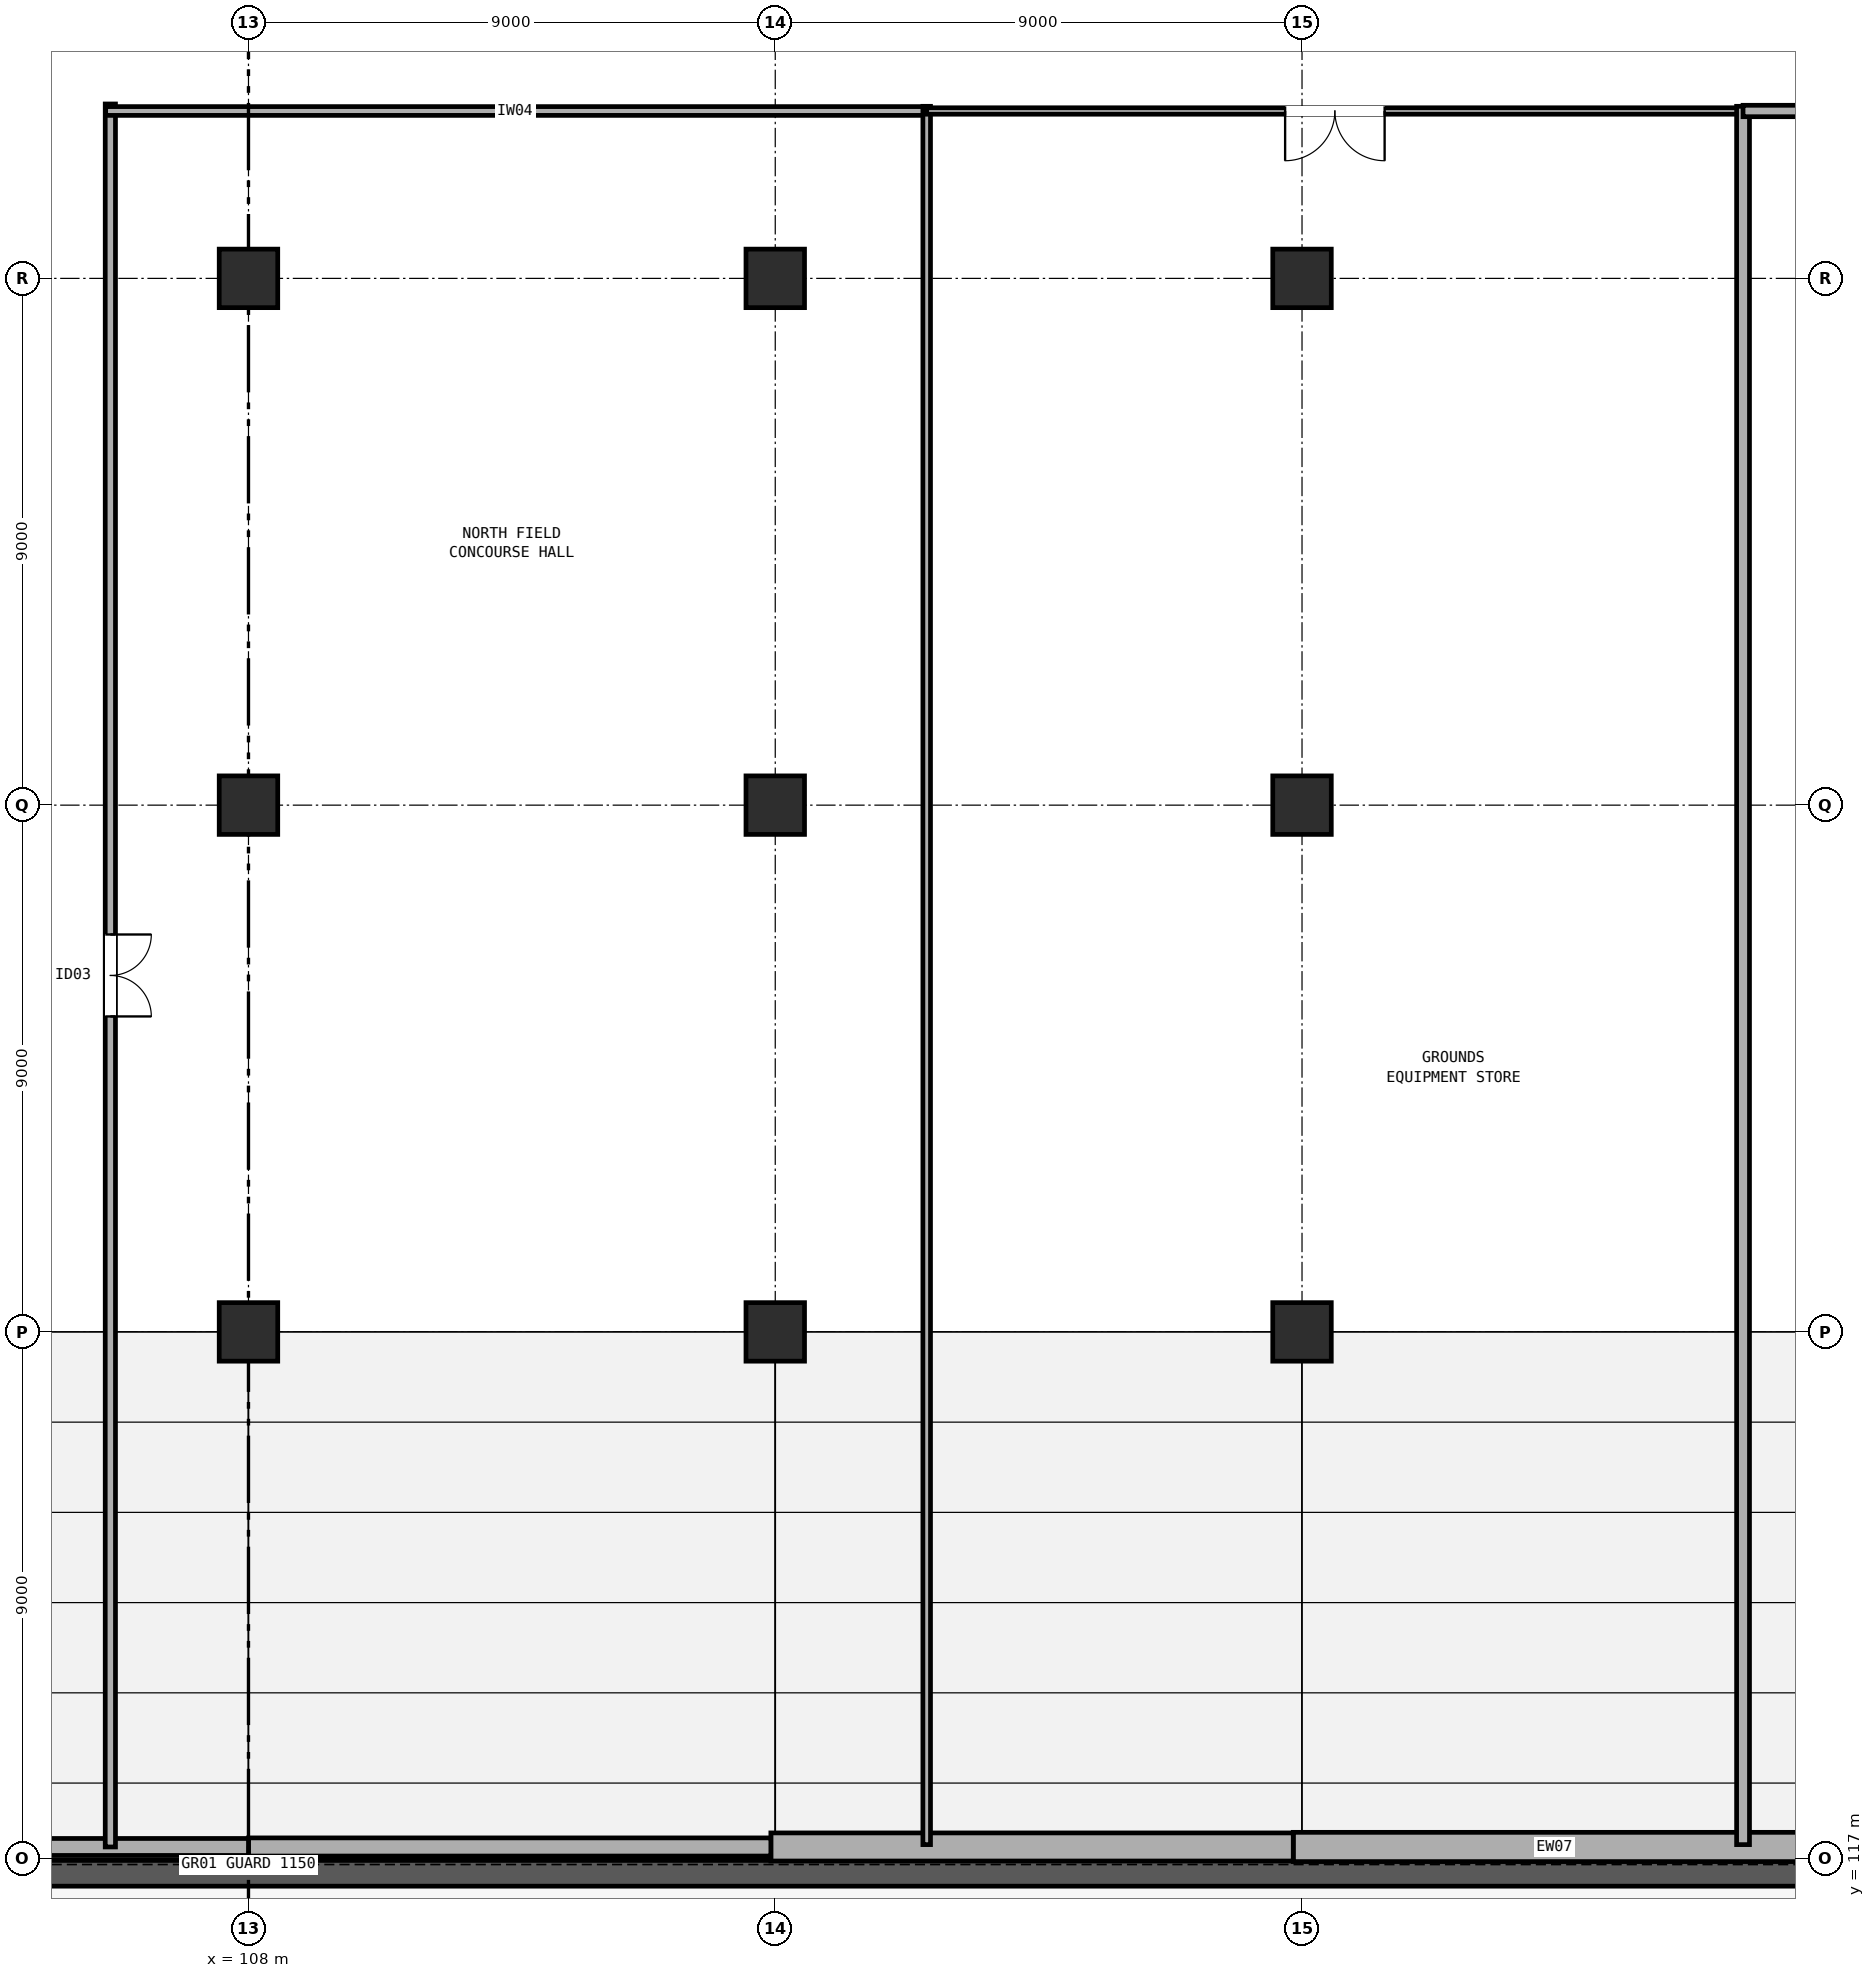
"""IFC4 building model, lengths in metres.
Left out: names, types, materials, properties, quantities, classifications, styles, units other than length and angle.
Written with IfcOpenShell. Run it as: python <this file> out.ifc"""

import sys

from ifc_helpers import new_model, si_unit, direction, frame, frame_2d, origin, origin_2d, place, context, subcontext, project, spatial, rectangle, extrude, element, fill, save


model = new_model("IFC4")
c1 = context("Model", 3, precision=1e-05, world=origin(), true_north=direction((0.0, 1.0)))
c2 = subcontext(c1, "Body", "Model", "MODEL_VIEW")
j1 = project(units=[si_unit("LENGTHUNIT", "METRE"), si_unit("PLANEANGLEUNIT", "RADIAN")], contexts=[c1])
p1 = place(None, origin())
s1 = spatial("IfcSite", under=j1, at=p1, CompositionType="ELEMENT")
p2 = place(p1, origin())
s2 = spatial("IfcBuilding", under=s1, at=p2, CompositionType="ELEMENT")
p3 = place(p2, origin())
s3 = spatial("IfcBuildingStorey", under=s2, at=p3, CompositionType="ELEMENT", Elevation=0.0)
for number, where, z_axis, x_axis in (
    (1, (108.0, 126.0, 0.0), (0.0, 0.0, 1.0), (1.0, 0.0, 0.0)),
    (2, (108.0, 135.0, 0.0), (0.0, 0.0, 1.0), (1.0, 0.0, 0.0)),
    (3, (108.0, 144.0, 0.0), (0.0, 0.0, 1.0), (1.0, 0.0, 0.0)),
    (4, (117.0, 126.0, 0.0), (0.0, 0.0, 1.0), (1.0, 0.0, 0.0)),
    (5, (117.0, 135.0, 0.0), (0.0, 0.0, 1.0), (1.0, 0.0, 0.0)),
    (6, (117.0, 144.0, 0.0), (0.0, 0.0, 1.0), (1.0, 0.0, 0.0)),
    (7, (126.0, 126.0, 0.0), (0.0, 0.0, 1.0), (1.0, 0.0, 0.0)),
    (8, (126.0, 135.0, 0.0), (0.0, 0.0, 1.0), (1.0, 0.0, 0.0)),
    (9, (126.0, 144.0, 0.0), (0.0, 0.0, 1.0), (1.0, 0.0, 0.0)),
):
    element("IfcColumn", number, at=place(p3, frame(where, z_axis=z_axis, x_axis=x_axis)), inside=s3, PredefinedType="COLUMN", context=c2, shape_type="SweptSolid", body=[
        extrude(rectangle(XDim=1.0, YDim=1.0, at=origin_2d()), origin(), (0.0, 0.0, 1.0), 4.8),
    ])
p4 = place(p3, frame((160.9, 116.75, 0.0), z_axis=(0.0, 0.0, 1.0), x_axis=(-1.0, 0.0, 0.0)))
e10 = element("IfcWall", 10, at=p4, inside=s3, PredefinedType="SOLIDWALL", context=c2, shape_type="SweptSolid", body=[
    extrude(rectangle(XDim=105.8, YDim=0.44, at=frame_2d((52.9, 0.0))), origin(), (0.0, 0.0, 1.0), 0.9),
])
p5 = place(p3, frame((134.775, 117.2, 0.0), z_axis=(0.0, 0.0, 1.0), x_axis=(-1.0, 0.0, 0.0)))
e11 = element("IfcWall", 11, at=p5, inside=s3, PredefinedType="SOLIDWALL", context=c2, shape_type="SweptSolid", body=[
    extrude(rectangle(XDim=8.925, YDim=0.5, at=frame_2d((4.462, 0.0))), origin(), (0.0, 0.0, 1.0), 3.28),
])
p6 = place(p3, frame((125.85, 117.2, 0.0), z_axis=(0.0, 0.0, 1.0), x_axis=(-1.0, 0.0, 0.0)))
e12 = element("IfcWall", 12, at=p6, inside=s3, PredefinedType="SOLIDWALL", context=c2, shape_type="SweptSolid", body=[
    extrude(rectangle(XDim=8.925, YDim=0.48, at=frame_2d((4.462, 0.0))), origin(), (0.0, 0.0, 1.0), 3.28),
])
p7 = place(p3, frame((116.925, 117.2, 0.0), z_axis=(0.0, 0.0, 1.0), x_axis=(-1.0, 0.0, 0.0)))
e13 = element("IfcWall", 13, at=p7, inside=s3, PredefinedType="SOLIDWALL", context=c2, shape_type="SweptSolid", body=[
    extrude(rectangle(XDim=8.925, YDim=0.31, at=frame_2d((4.462, 0.0))), origin(), (0.0, 0.0, 1.0), 3.28),
])
p8 = place(p3, frame((108.0, 117.2, 0.0), z_axis=(0.0, 0.0, 1.0), x_axis=(-1.0, 0.0, 0.0)))
e14 = element("IfcWall", 14, at=p8, inside=s3, PredefinedType="SOLIDWALL", context=c2, shape_type="SweptSolid", body=[
    extrude(rectangle(XDim=8.925, YDim=0.29, at=frame_2d((4.462, 0.0))), origin(), (0.0, 0.0, 1.0), 3.28),
])
p9 = place(p3, frame((105.64, 146.98, 0.0), z_axis=(0.0, 0.0, 1.0), x_axis=(0.0, -1.0, 0.0)))
e15 = element("IfcWall", 15, at=p9, inside=s3, PredefinedType="PARTITIONING", context=c2, shape_type="SweptSolid", body=[
    extrude(rectangle(XDim=29.78, YDim=0.175, at=frame_2d((14.89, 0.0))), origin(), (0.0, 0.0, 1.0), 3.28),
])
p10 = place(p9, frame((14.19, 0.0, 0.0)))
e16 = element("IfcOpeningElement", 16, at=p10, cuts=e15, PredefinedType="OPENING", context=c2, shape_type="SweptSolid", body=[
    extrude(rectangle(XDim=1.4, YDim=2.15, at=frame_2d((0.7, 1.075))), frame((0.0, 0.097, 0.0), z_axis=(0.0, -1.0, 0.0), x_axis=(1.0, 0.0, 0.0)), (0.0, 0.0, 1.0), 0.195),
])
p11 = place(p3, frame((105.56, 146.86, 0.0), z_axis=(0.0, 0.0, 1.0), x_axis=(1.0, 0.0, 0.0)))
e17 = element("IfcWall", 17, at=p11, inside=s3, PredefinedType="PARTITIONING", context=c2, shape_type="SweptSolid", body=[
    extrude(rectangle(XDim=13.988, YDim=0.15, at=frame_2d((6.994, 0.0))), origin(), (0.0, 0.0, 1.0), 3.28),
])
p12 = place(p3, frame((119.587, 146.94, 0.0), z_axis=(0.0, 0.0, 1.0), x_axis=(0.0, -1.0, 0.0)))
e18 = element("IfcWall", 18, at=p12, inside=s3, PredefinedType="PARTITIONING", context=c2, shape_type="SweptSolid", body=[
    extrude(rectangle(XDim=29.7, YDim=0.13, at=frame_2d((14.85, 0.0))), origin(), (0.0, 0.0, 1.0), 3.28),
])
p13 = place(p3, frame((133.535, 146.86, 0.0), z_axis=(0.0, 0.0, 1.0), x_axis=(-1.0, 0.0, 0.0)))
e19 = element("IfcWall", 19, at=p13, inside=s3, PredefinedType="PARTITIONING", context=c2, shape_type="SweptSolid", body=[
    extrude(rectangle(XDim=13.948, YDim=0.11, at=frame_2d((6.974, 0.0))), origin(), (0.0, 0.0, 1.0), 3.28),
])
p14 = place(p13, frame((6.124, 0.0, 0.0)))
e20 = element("IfcOpeningElement", 20, at=p14, cuts=e19, PredefinedType="OPENING", context=c2, shape_type="SweptSolid", body=[
    extrude(rectangle(XDim=1.7, YDim=2.2, at=frame_2d((0.85, 1.1))), frame((0.0, 0.065, 0.0), z_axis=(0.0, -1.0, 0.0), x_axis=(1.0, 0.0, 0.0)), (0.0, 0.0, 1.0), 0.13),
])
p15 = place(p3, frame((133.535, 146.94, 0.0), z_axis=(0.0, 0.0, 1.0), x_axis=(0.0, -1.0, 0.0)))
e21 = element("IfcWall", 21, at=p15, inside=s3, PredefinedType="PARTITIONING", context=c2, shape_type="SweptSolid", body=[
    extrude(rectangle(XDim=29.7, YDim=0.22, at=frame_2d((14.85, 0.0))), origin(), (0.0, 0.0, 1.0), 3.28),
])
p16 = place(p3, frame((145.28, 146.86, 0.0), z_axis=(0.0, 0.0, 1.0), x_axis=(-1.0, 0.0, 0.0)))
e22 = element("IfcWall", 22, at=p16, inside=s3, PredefinedType="PARTITIONING", context=c2, shape_type="SweptSolid", body=[
    extrude(rectangle(XDim=11.745, YDim=0.195, at=frame_2d((5.873, 0.0))), origin(), (0.0, 0.0, 1.0), 3.28),
])
p17 = place(p16, frame((5.173, 0.0, 0.0)))
e23 = element("IfcOpeningElement", 23, at=p17, cuts=e22, PredefinedType="OPENING", context=c2, shape_type="SweptSolid", body=[
    extrude(rectangle(XDim=1.4, YDim=2.15, at=frame_2d((0.7, 1.075))), frame((0.0, 0.107, 0.0), z_axis=(0.0, -1.0, 0.0), x_axis=(1.0, 0.0, 0.0)), (0.0, 0.0, 1.0), 0.215),
])
p18 = place(p10, origin())
e24 = element("IfcDoor", 24, at=p18, inside=s3, OperationType="DOUBLE_DOOR_SINGLE_SWING", PredefinedType="DOOR", context=c2, shape_type="SweptSolid", body=[
    extrude(rectangle(XDim=1.4, YDim=2.15, at=frame_2d((0.7, 1.075))), frame((0.0, 0.025, 0.0), z_axis=(0.0, -1.0, 0.0), x_axis=(1.0, 0.0, 0.0)), (0.0, 0.0, 1.0), 0.05),
])
fill(e16, e24)
p19 = place(p14, origin())
e25 = element("IfcDoor", 25, at=p19, inside=s3, OperationType="DOUBLE_DOOR_SINGLE_SWING", PredefinedType="DOOR", context=c2, shape_type="SweptSolid", body=[
    extrude(rectangle(XDim=1.7, YDim=2.2, at=frame_2d((0.85, 1.1))), frame((0.0, 0.025, 0.0), z_axis=(0.0, -1.0, 0.0), x_axis=(1.0, 0.0, 0.0)), (0.0, 0.0, 1.0), 0.05),
])
fill(e20, e25)
save(model, sys.argv[1])
